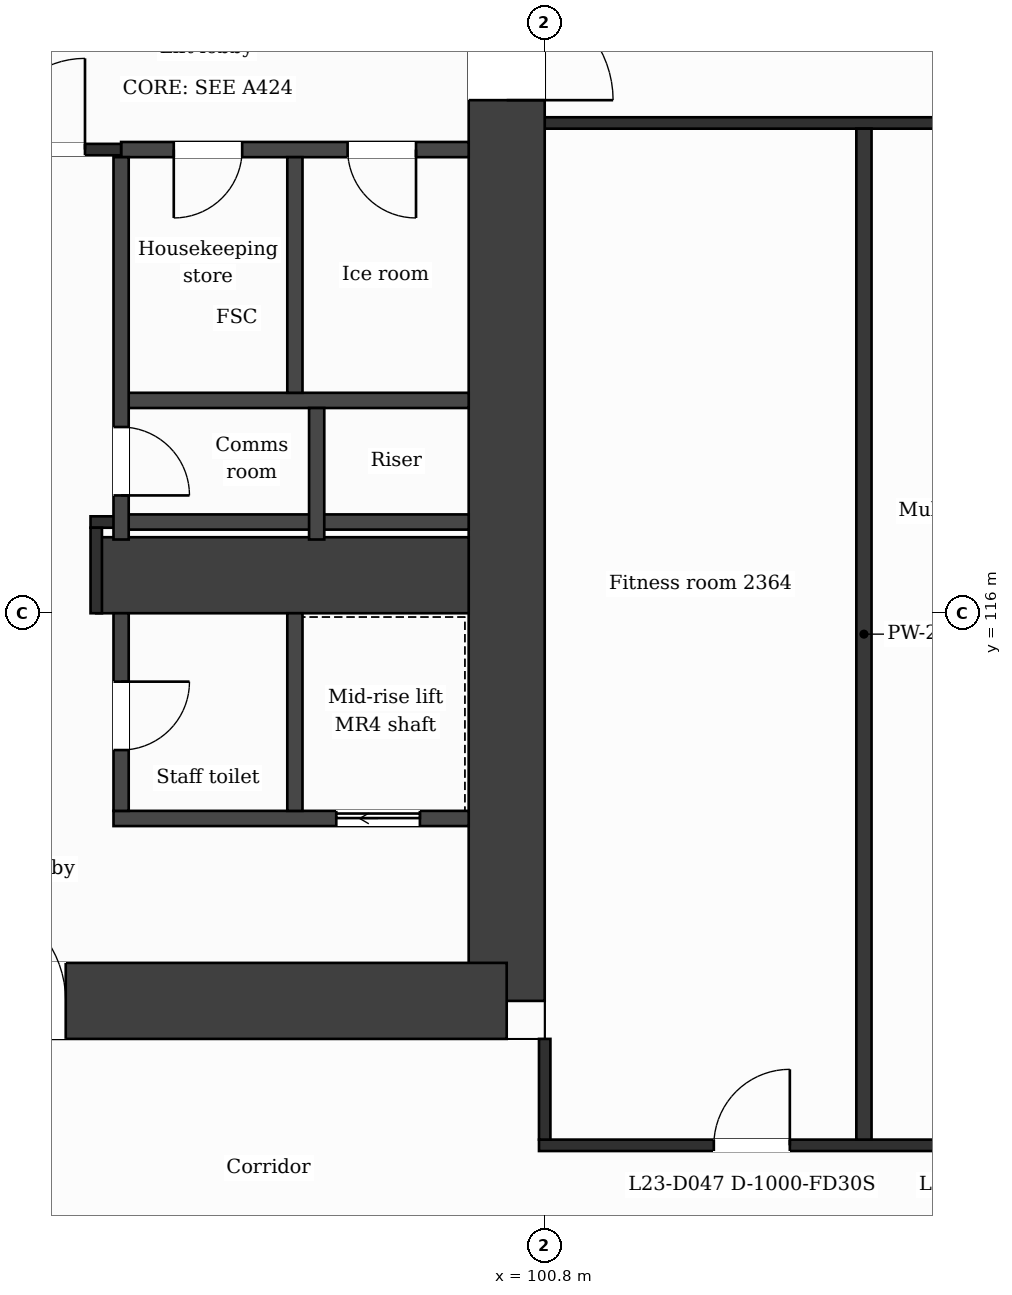
"""IFC4 building model, lengths in metres.
Left out: names, types, materials, properties, quantities, classifications, styles, units other than length and angle.
Written with IfcOpenShell. Run it as: python <this file> out.ifc"""

import sys

from ifc_helpers import new_model, si_unit, direction, frame, frame_2d, origin, place, context, subcontext, project, spatial, rectangle, extrude, element, fill, save


model = new_model("IFC4")
c1 = context("Model", 3, precision=1e-05, world=origin(), true_north=direction((0.0, 1.0)))
c2 = subcontext(c1, "Body", "Model", "MODEL_VIEW")
j1 = project(units=[si_unit("LENGTHUNIT", "METRE"), si_unit("PLANEANGLEUNIT", "RADIAN")], contexts=[c1])
p1 = place(None, origin())
s1 = spatial("IfcSite", under=j1, at=p1, CompositionType="ELEMENT")
p2 = place(p1, origin())
s2 = spatial("IfcBuilding", under=s1, at=p2, CompositionType="ELEMENT")
p3 = place(p2, frame((0.0, 0.0, 102.1)))
s3 = spatial("IfcBuildingStorey", under=s2, at=p3, CompositionType="ELEMENT", Elevation=102.1)
p4 = place(p3, frame((100.3, 131.9, 0.0), z_axis=(0.0, 0.0, 1.0), x_axis=(0.0, -1.0, 0.0)))
e1 = element("IfcWall", 1, at=p4, inside=s3, PredefinedType="SHEAR", context=c2, shape_type="SweptSolid", body=[
    extrude(rectangle(XDim=21.0, YDim=1.0, at=frame_2d((10.5, 0.0))), origin(), (0.0, 0.0, 1.0), 3.7),
])
p5 = place(p4, frame((7.75, 0.0, 0.0)))
e2 = element("IfcOpeningElement", 2, at=p5, cuts=e1, PredefinedType="OPENING", context=c2, shape_type="SweptSolid", body=[
    extrude(rectangle(XDim=1.4, YDim=2.1, at=frame_2d((0.7, 1.05))), frame((0.0, 0.51, 0.0), z_axis=(0.0, -1.0, 0.0), x_axis=(1.0, 0.0, 0.0)), (0.0, 0.0, 1.0), 1.02),
])
p6 = place(p3, frame((100.3, 110.9, 0.0), z_axis=(0.0, 0.0, 1.0), x_axis=(-1.0, 0.0, 0.0)))
e3 = element("IfcWall", 3, at=p6, inside=s3, PredefinedType="SHEAR", context=c2, shape_type="SweptSolid", body=[
    extrude(rectangle(XDim=14.059, YDim=1.0, at=frame_2d((7.03, 0.0))), origin(), (0.0, 0.0, 1.0), 3.7),
])
p7 = place(p6, frame((5.802, 0.0, 0.0)))
e4 = element("IfcOpeningElement", 4, at=p7, cuts=e3, PredefinedType="OPENING", context=c2, shape_type="SweptSolid", body=[
    extrude(rectangle(XDim=1.4, YDim=2.1, at=frame_2d((0.7, 1.05))), frame((0.0, 0.51, 0.0), z_axis=(0.0, -1.0, 0.0), x_axis=(1.0, 0.0, 0.0)), (0.0, 0.0, 1.0), 1.02),
])
p8 = place(p3, frame((94.9, 116.5, 0.0), z_axis=(0.0, 0.0, 1.0), x_axis=(1.0, 0.0, 0.0)))
e5 = element("IfcWall", 5, at=p8, inside=s3, PredefinedType="SHEAR", context=c2, shape_type="SweptSolid", body=[
    extrude(rectangle(XDim=4.9, YDim=1.0, at=frame_2d((2.45, 0.0))), origin(), (0.0, 0.0, 1.0), 3.7),
])
p9 = place(p3, frame((100.725, 109.0, 0.0), z_axis=(0.0, 0.0, 1.0), x_axis=(1.0, 0.0, 0.0)))
e6 = element("IfcWall", 6, at=p9, inside=s3, PredefinedType="PARTITIONING", context=c2, shape_type="SweptSolid", body=[
    extrude(rectangle(XDim=25.35, YDim=0.15, at=frame_2d((12.675, 0.0))), origin(), (0.0, 0.0, 1.0), 3.38),
])
p10 = place(p9, frame((2.3, 0.0, 0.0)))
e7 = element("IfcOpeningElement", 7, at=p10, cuts=e6, PredefinedType="OPENING", context=c2, shape_type="SweptSolid", body=[
    extrude(rectangle(XDim=1.0, YDim=2.1, at=frame_2d((0.5, 1.05))), frame((0.0, 0.085, 0.0), z_axis=(0.0, -1.0, 0.0), x_axis=(1.0, 0.0, 0.0)), (0.0, 0.0, 1.0), 0.17),
])
p11 = place(p9, frame((6.125, 0.0, 0.0)))
e8 = element("IfcOpeningElement", 8, at=p11, cuts=e6, PredefinedType="OPENING", context=c2, shape_type="SweptSolid", body=[
    extrude(rectangle(XDim=1.0, YDim=2.1, at=frame_2d((0.5, 1.05))), frame((0.0, 0.085, 0.0), z_axis=(0.0, -1.0, 0.0), x_axis=(1.0, 0.0, 0.0)), (0.0, 0.0, 1.0), 0.17),
])
p12 = place(p9, frame((10.075, 0.0, 0.0)))
e9 = element("IfcOpeningElement", 9, at=p12, cuts=e6, PredefinedType="OPENING", context=c2, shape_type="SweptSolid", body=[
    extrude(rectangle(XDim=1.0, YDim=2.1, at=frame_2d((0.5, 1.05))), frame((0.0, 0.085, 0.0), z_axis=(0.0, -1.0, 0.0), x_axis=(1.0, 0.0, 0.0)), (0.0, 0.0, 1.0), 0.17),
])
p13 = place(p9, frame((14.275, 0.0, 0.0)))
e10 = element("IfcOpeningElement", 10, at=p13, cuts=e6, PredefinedType="OPENING", context=c2, shape_type="SweptSolid", body=[
    extrude(rectangle(XDim=1.0, YDim=2.1, at=frame_2d((0.5, 1.05))), frame((0.0, 0.085, 0.0), z_axis=(0.0, -1.0, 0.0), x_axis=(1.0, 0.0, 0.0)), (0.0, 0.0, 1.0), 0.17),
])
p14 = place(p9, frame((17.85, 0.0, 0.0)))
e11 = element("IfcOpeningElement", 11, at=p14, cuts=e6, PredefinedType="OPENING", context=c2, shape_type="SweptSolid", body=[
    extrude(rectangle(XDim=1.0, YDim=2.1, at=frame_2d((0.5, 1.05))), frame((0.0, 0.085, 0.0), z_axis=(0.0, -1.0, 0.0), x_axis=(1.0, 0.0, 0.0)), (0.0, 0.0, 1.0), 0.17),
])
p15 = place(p9, frame((22.925, 0.0, 0.0)))
e12 = element("IfcOpeningElement", 12, at=p15, cuts=e6, PredefinedType="OPENING", context=c2, shape_type="SweptSolid", body=[
    extrude(rectangle(XDim=1.0, YDim=2.1, at=frame_2d((0.5, 1.05))), frame((0.0, 0.085, 0.0), z_axis=(0.0, -1.0, 0.0), x_axis=(1.0, 0.0, 0.0)), (0.0, 0.0, 1.0), 0.17),
])
p16 = place(p3, frame((95.127, 113.3, 0.0), z_axis=(0.0, 0.0, 1.0), x_axis=(1.0, 0.0, 0.0)))
e13 = element("IfcWall", 13, at=p16, inside=s3, PredefinedType="PARTITIONING", context=c2, shape_type="SweptSolid", body=[
    extrude(rectangle(XDim=4.673, YDim=0.2, at=frame_2d((2.336, 0.0))), origin(), (0.0, 0.0, 1.0), 3.38),
])
p17 = place(p16, frame((2.931, 0.0, 0.0)))
e14 = element("IfcOpeningElement", 14, at=p17, cuts=e13, PredefinedType="OPENING", context=c2, shape_type="SweptSolid", body=[
    extrude(rectangle(XDim=1.1, YDim=2.1, at=frame_2d((0.55, 1.05))), frame((0.0, 0.11, 0.0), z_axis=(0.0, -1.0, 0.0), x_axis=(1.0, 0.0, 0.0)), (0.0, 0.0, 1.0), 0.22),
])
p18 = place(p3, frame((95.227, 117.2, 0.0), z_axis=(0.0, 0.0, 1.0), x_axis=(1.0, 0.0, 0.0)))
e15 = element("IfcWall", 15, at=p18, inside=s3, PredefinedType="PARTITIONING", context=c2, shape_type="SweptSolid", body=[
    extrude(rectangle(XDim=4.573, YDim=0.2, at=frame_2d((2.287, 0.0))), origin(), (0.0, 0.0, 1.0), 3.38),
])
p19 = place(p3, frame((94.825, 117.2, 0.0), z_axis=(0.0, 0.0, 1.0), x_axis=(1.0, 0.0, 0.0)))
e16 = element("IfcWall", 16, at=p19, inside=s3, PredefinedType="PARTITIONING", context=c2, shape_type="SweptSolid", body=[
    extrude(rectangle(XDim=0.402, YDim=0.15, at=frame_2d((0.201, 0.0))), origin(), (0.0, 0.0, 1.0), 3.38),
])
p20 = place(p3, frame((95.227, 118.8, 0.0), z_axis=(0.0, 0.0, 1.0), x_axis=(1.0, 0.0, 0.0)))
e17 = element("IfcWall", 17, at=p20, inside=s3, PredefinedType="PARTITIONING", context=c2, shape_type="SweptSolid", body=[
    extrude(rectangle(XDim=4.573, YDim=0.2, at=frame_2d((2.287, 0.0))), origin(), (0.0, 0.0, 1.0), 3.38),
])
p21 = place(p3, frame((95.227, 122.1, 0.0), z_axis=(0.0, 0.0, 1.0), x_axis=(1.0, 0.0, 0.0)))
e18 = element("IfcWall", 18, at=p21, inside=s3, PredefinedType="PARTITIONING", context=c2, shape_type="SweptSolid", body=[
    extrude(rectangle(XDim=4.573, YDim=0.2, at=frame_2d((2.287, 0.0))), origin(), (0.0, 0.0, 1.0), 3.38),
])
p22 = place(p21, frame((0.693, 0.0, 0.0)))
e19 = element("IfcOpeningElement", 19, at=p22, cuts=e18, PredefinedType="OPENING", context=c2, shape_type="SweptSolid", body=[
    extrude(rectangle(XDim=0.9, YDim=2.1, at=frame_2d((0.45, 1.05))), frame((0.0, 0.11, 0.0), z_axis=(0.0, -1.0, 0.0), x_axis=(1.0, 0.0, 0.0)), (0.0, 0.0, 1.0), 0.22),
])
p23 = place(p21, frame((2.98, 0.0, 0.0)))
e20 = element("IfcOpeningElement", 20, at=p23, cuts=e18, PredefinedType="OPENING", context=c2, shape_type="SweptSolid", body=[
    extrude(rectangle(XDim=0.9, YDim=2.1, at=frame_2d((0.45, 1.05))), frame((0.0, 0.11, 0.0), z_axis=(0.0, -1.0, 0.0), x_axis=(1.0, 0.0, 0.0)), (0.0, 0.0, 1.0), 0.22),
])
p24 = place(p3, frame((92.827, 122.1, 0.0), z_axis=(0.0, 0.0, 1.0), x_axis=(1.0, 0.0, 0.0)))
e21 = element("IfcWall", 21, at=p24, inside=s3, PredefinedType="PARTITIONING", context=c2, shape_type="SweptSolid", body=[
    extrude(rectangle(XDim=2.4, YDim=0.15, at=frame_2d((1.2, 0.0))), origin(), (0.0, 0.0, 1.0), 3.38),
])
p25 = place(p24, frame((0.725, 0.0, 0.0)))
e22 = element("IfcOpeningElement", 22, at=p25, cuts=e21, PredefinedType="OPENING", context=c2, shape_type="SweptSolid", body=[
    extrude(rectangle(XDim=1.2, YDim=2.1, at=frame_2d((0.6, 1.05))), frame((0.0, 0.085, 0.0), z_axis=(0.0, -1.0, 0.0), x_axis=(1.0, 0.0, 0.0)), (0.0, 0.0, 1.0), 0.17),
])
p26 = place(p3, frame((100.8, 122.45, 0.0), z_axis=(0.0, 0.0, 1.0), x_axis=(1.0, 0.0, 0.0)))
e23 = element("IfcWall", 23, at=p26, inside=s3, PredefinedType="PARTITIONING", context=c2, shape_type="SweptSolid", body=[
    extrude(rectangle(XDim=25.2, YDim=0.15, at=frame_2d((12.6, 0.0))), origin(), (0.0, 0.0, 1.0), 3.38),
])
p27 = place(p3, frame((94.9, 116.0, 0.0), z_axis=(0.0, 0.0, 1.0), x_axis=(0.0, 1.0, 0.0)))
e24 = element("IfcWall", 24, at=p27, inside=s3, PredefinedType="PARTITIONING", context=c2, shape_type="SweptSolid", body=[
    extrude(rectangle(XDim=1.125, YDim=0.15, at=frame_2d((0.562, 0.0))), origin(), (0.0, 0.0, 1.0), 3.38),
])
p28 = place(p3, frame((95.227, 113.4, 0.0), z_axis=(0.0, 0.0, 1.0), x_axis=(0.0, 1.0, 0.0)))
e25 = element("IfcWall", 25, at=p28, inside=s3, PredefinedType="PARTITIONING", context=c2, shape_type="SweptSolid", body=[
    extrude(rectangle(XDim=2.6, YDim=0.2, at=frame_2d((1.3, 0.0))), origin(), (0.0, 0.0, 1.0), 3.38),
])
p29 = place(p28, frame((0.8, 0.0, 0.0)))
e26 = element("IfcOpeningElement", 26, at=p29, cuts=e25, PredefinedType="OPENING", context=c2, shape_type="SweptSolid", body=[
    extrude(rectangle(XDim=0.9, YDim=2.1, at=frame_2d((0.45, 1.05))), frame((0.0, 0.11, 0.0), z_axis=(0.0, -1.0, 0.0), x_axis=(1.0, 0.0, 0.0)), (0.0, 0.0, 1.0), 0.22),
])
p30 = place(p3, frame((95.227, 116.97, 0.0), z_axis=(0.0, 0.0, 1.0), x_axis=(0.0, 1.0, 0.0)))
e27 = element("IfcWall", 27, at=p30, inside=s3, PredefinedType="PARTITIONING", context=c2, shape_type="SweptSolid", body=[
    extrude(rectangle(XDim=5.03, YDim=0.2, at=frame_2d((2.515, 0.0))), origin(), (0.0, 0.0, 1.0), 3.38),
])
p31 = place(p30, frame((0.58, 0.0, 0.0)))
e28 = element("IfcOpeningElement", 28, at=p31, cuts=e27, PredefinedType="OPENING", context=c2, shape_type="SweptSolid", body=[
    extrude(rectangle(XDim=0.9, YDim=2.1, at=frame_2d((0.45, 1.05))), frame((0.0, 0.11, 0.0), z_axis=(0.0, -1.0, 0.0), x_axis=(1.0, 0.0, 0.0)), (0.0, 0.0, 1.0), 0.22),
])
p32 = place(p3, frame((97.513, 113.4, 0.0), z_axis=(0.0, 0.0, 1.0), x_axis=(0.0, 1.0, 0.0)))
e29 = element("IfcWall", 29, at=p32, inside=s3, PredefinedType="PARTITIONING", context=c2, shape_type="SweptSolid", body=[
    extrude(rectangle(XDim=2.6, YDim=0.2, at=frame_2d((1.3, 0.0))), origin(), (0.0, 0.0, 1.0), 3.38),
])
p33 = place(p3, frame((97.513, 118.9, 0.0), z_axis=(0.0, 0.0, 1.0), x_axis=(0.0, 1.0, 0.0)))
e30 = element("IfcWall", 30, at=p33, inside=s3, PredefinedType="PARTITIONING", context=c2, shape_type="SweptSolid", body=[
    extrude(rectangle(XDim=3.1, YDim=0.2, at=frame_2d((1.55, 0.0))), origin(), (0.0, 0.0, 1.0), 3.38),
])
p34 = place(p3, frame((97.8, 116.97, 0.0), z_axis=(0.0, 0.0, 1.0), x_axis=(0.0, 1.0, 0.0)))
e31 = element("IfcWall", 31, at=p34, inside=s3, PredefinedType="PARTITIONING", context=c2, shape_type="SweptSolid", body=[
    extrude(rectangle(XDim=1.73, YDim=0.2, at=frame_2d((0.865, 0.0))), origin(), (0.0, 0.0, 1.0), 3.38),
])
p35 = place(p3, frame((100.8, 109.075, 0.0), z_axis=(0.0, 0.0, 1.0), x_axis=(0.0, 1.0, 0.0)))
e32 = element("IfcWall", 32, at=p35, inside=s3, PredefinedType="PARTITIONING", context=c2, shape_type="SweptSolid", body=[
    extrude(rectangle(XDim=1.325, YDim=0.15, at=frame_2d((0.663, 0.0))), origin(), (0.0, 0.0, 1.0), 3.38),
])
p36 = place(p3, frame((105.0, 109.075, 0.0), z_axis=(0.0, 0.0, 1.0), x_axis=(0.0, 1.0, 0.0)))
e33 = element("IfcWall", 33, at=p36, inside=s3, PredefinedType="PARTITIONING", context=c2, shape_type="SweptSolid", body=[
    extrude(rectangle(XDim=13.3, YDim=0.2, at=frame_2d((6.65, 0.0))), origin(), (0.0, 0.0, 1.0), 3.38),
])
p37 = place(p25, origin())
e34 = element("IfcDoor", 34, at=p37, inside=s3, OperationType="SINGLE_SWING_RIGHT", PredefinedType="DOOR", context=c2, shape_type="SweptSolid", body=[
    extrude(rectangle(XDim=1.2, YDim=2.1, at=frame_2d((0.6, 1.05))), frame((0.0, 0.025, 0.0), z_axis=(0.0, -1.0, 0.0), x_axis=(1.0, 0.0, 0.0)), (0.0, 0.0, 1.0), 0.05),
])
fill(e22, e34)
p38 = place(p22, origin())
e35 = element("IfcDoor", 35, at=p38, inside=s3, OperationType="SINGLE_SWING_LEFT", PredefinedType="DOOR", context=c2, shape_type="SweptSolid", body=[
    extrude(rectangle(XDim=0.9, YDim=2.1, at=frame_2d((0.45, 1.05))), frame((0.0, 0.025, 0.0), z_axis=(0.0, -1.0, 0.0), x_axis=(1.0, 0.0, 0.0)), (0.0, 0.0, 1.0), 0.05),
])
fill(e19, e35)
p39 = place(p23, origin())
e36 = element("IfcDoor", 36, at=p39, inside=s3, OperationType="SINGLE_SWING_RIGHT", PredefinedType="DOOR", context=c2, shape_type="SweptSolid", body=[
    extrude(rectangle(XDim=0.9, YDim=2.1, at=frame_2d((0.45, 1.05))), frame((0.0, 0.025, 0.0), z_axis=(0.0, -1.0, 0.0), x_axis=(1.0, 0.0, 0.0)), (0.0, 0.0, 1.0), 0.05),
])
fill(e20, e36)
p40 = place(p31, origin())
e37 = element("IfcDoor", 37, at=p40, inside=s3, OperationType="SINGLE_SWING_LEFT", PredefinedType="DOOR", context=c2, shape_type="SweptSolid", body=[
    extrude(rectangle(XDim=0.9, YDim=2.1, at=frame_2d((0.45, 1.05))), frame((0.0, 0.025, 0.0), z_axis=(0.0, -1.0, 0.0), x_axis=(1.0, 0.0, 0.0)), (0.0, 0.0, 1.0), 0.05),
])
fill(e28, e37)
p41 = place(p17, origin())
e38 = element("IfcDoor", 38, at=p41, inside=s3, OperationType="SLIDING_TO_LEFT", PredefinedType="DOOR", context=c2, shape_type="SweptSolid", body=[
    extrude(rectangle(XDim=1.1, YDim=2.1, at=frame_2d((0.55, 1.05))), frame((0.0, 0.025, 0.0), z_axis=(0.0, -1.0, 0.0), x_axis=(1.0, 0.0, 0.0)), (0.0, 0.0, 1.0), 0.05),
])
fill(e14, e38)
p42 = place(p29, origin())
e39 = element("IfcDoor", 39, at=p42, inside=s3, OperationType="SINGLE_SWING_RIGHT", PredefinedType="DOOR", context=c2, shape_type="SweptSolid", body=[
    extrude(rectangle(XDim=0.9, YDim=2.1, at=frame_2d((0.45, 1.05))), frame((0.0, 0.025, 0.0), z_axis=(0.0, -1.0, 0.0), x_axis=(1.0, 0.0, 0.0)), (0.0, 0.0, 1.0), 0.05),
])
fill(e26, e39)
p43 = place(p10, origin())
e40 = element("IfcDoor", 40, at=p43, inside=s3, OperationType="SINGLE_SWING_RIGHT", PredefinedType="DOOR", context=c2, shape_type="SweptSolid", body=[
    extrude(rectangle(XDim=1.0, YDim=2.1, at=frame_2d((0.5, 1.05))), frame((0.0, 0.025, 0.0), z_axis=(0.0, -1.0, 0.0), x_axis=(1.0, 0.0, 0.0)), (0.0, 0.0, 1.0), 0.05),
])
fill(e7, e40)
p44 = place(p7, origin())
e41 = element("IfcDoor", 41, at=p44, inside=s3, OperationType="SINGLE_SWING_RIGHT", PredefinedType="DOOR", context=c2, shape_type="SweptSolid", body=[
    extrude(rectangle(XDim=1.4, YDim=2.1, at=frame_2d((0.7, 1.05))), frame((0.0, 0.025, 0.0), z_axis=(0.0, -1.0, 0.0), x_axis=(1.0, 0.0, 0.0)), (0.0, 0.0, 1.0), 0.05),
])
fill(e4, e41)
p45 = place(p5, origin())
e42 = element("IfcDoor", 42, at=p45, inside=s3, OperationType="SINGLE_SWING_RIGHT", PredefinedType="DOOR", context=c2, shape_type="SweptSolid", body=[
    extrude(rectangle(XDim=1.4, YDim=2.1, at=frame_2d((0.7, 1.05))), frame((0.0, 0.025, 0.0), z_axis=(0.0, -1.0, 0.0), x_axis=(1.0, 0.0, 0.0)), (0.0, 0.0, 1.0), 0.05),
])
fill(e2, e42)
save(model, sys.argv[1])
